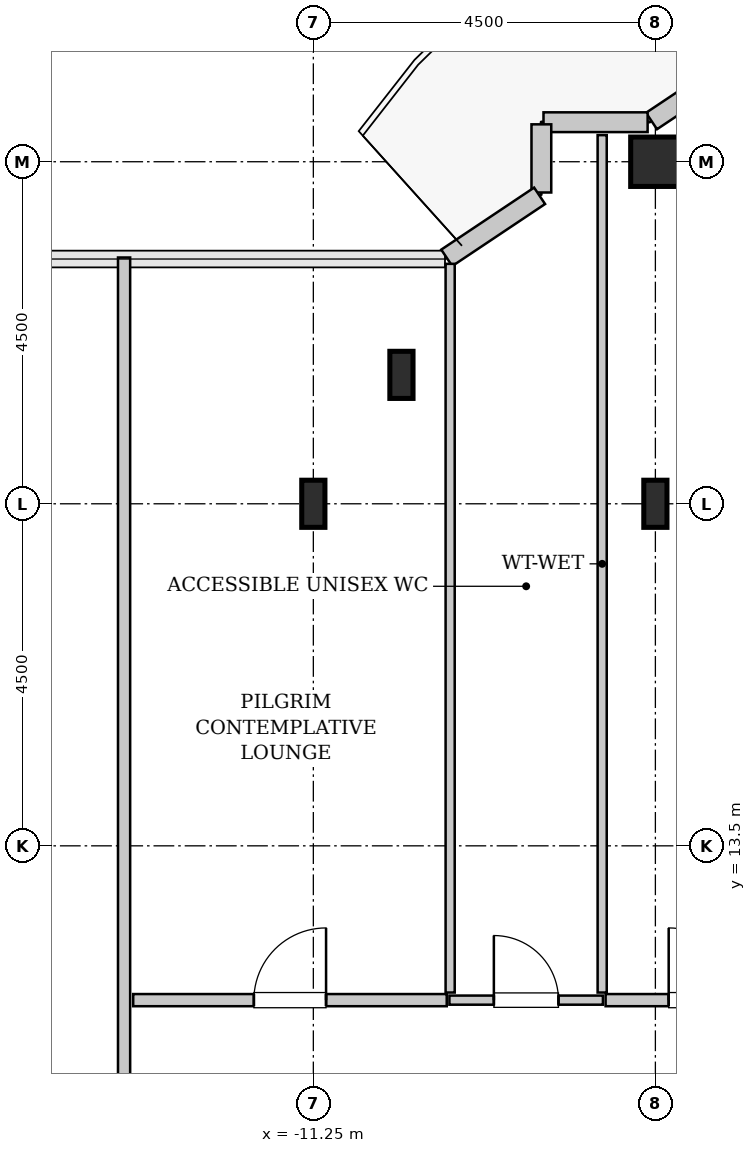
"""IFC4 building model, lengths in metres.
Left out: names, types, materials, properties, quantities, classifications, styles, units other than length and angle.
Written with IfcOpenShell. Run it as: python <this file> out.ifc"""

import sys

from ifc_helpers import new_model, si_unit, direction, frame, frame_2d, origin, origin_2d, place, context, subcontext, project, spatial, rectangle, hollow_rectangle, i_section, extrude, source, transform, mapped, element, fill, save


model = new_model("IFC4")
c1 = context("Model", 3, precision=1e-05, world=origin(), true_north=direction((0.0, 1.0)))
c2 = subcontext(c1, "Body", "Model", "MODEL_VIEW")
j1 = project(units=[si_unit("LENGTHUNIT", "METRE"), si_unit("PLANEANGLEUNIT", "RADIAN")], contexts=[c1])
p1 = place(None, origin())
s1 = spatial("IfcSite", under=j1, at=p1, CompositionType="ELEMENT")
p2 = place(p1, origin())
s2 = spatial("IfcBuilding", under=s1, at=p2, CompositionType="ELEMENT")
p3 = place(p2, frame((0.0, 0.0, 283.6)))
s3 = spatial("IfcBuildingStorey", under=s2, at=p3, CompositionType="ELEMENT", Elevation=283.6)
m1 = source(origin(), c2, "Body", "SweptSolid", [
    extrude(i_section(OverallWidth=0.305, OverallDepth=0.62, WebThickness=0.021, FlangeThickness=0.04, FilletRadius=0.027, at=origin_2d()), origin(), (0.0, 0.0, 1.0), 3.8),
])
for number, where, z_axis, x_axis in (
    (1, (-11.25, 18.0, 0.0), (0.0, 0.0, 1.0), (1.0, 0.0, 0.0)),
    (2, (-10.091, 19.696, 0.0), (0.0, 0.0, 1.0), (1.0, 0.0, 0.0)),
    (3, (-6.75, 18.0, 0.0), (0.0, 0.0, 1.0), (1.0, 0.0, 0.0)),
):
    element("IfcColumn", number, at=place(p3, frame(where, z_axis=z_axis, x_axis=x_axis)), inside=s3, PredefinedType="COLUMN", context=c2, shape_type="MappedRepresentation", body=[
        mapped(m1, transform((0.0, 0.0, 0.0), x_axis=(1.0, 0.0, 0.0), y_axis=(0.0, 1.0, 0.0), z_axis=(0.0, 0.0, 1.0), scale=1.0)),
    ])
m2 = source(origin(), c2, "Body", "SweptSolid", [
    extrude(hollow_rectangle(XDim=0.65, YDim=0.65, WallThickness=0.032, InnerFilletRadius=0.032, OuterFilletRadius=0.064, at=origin_2d()), origin(), (0.0, 0.0, 1.0), 3.8),
])
p4 = place(p3, frame((-6.75, 22.5, 0.0), z_axis=(0.0, 0.0, 1.0), x_axis=(1.0, 0.0, 0.0)))
e4 = element("IfcColumn", 4, at=p4, inside=s3, PredefinedType="COLUMN", context=c2, shape_type="MappedRepresentation", body=[
    mapped(m2, transform((0.0, 0.0, 0.0), x_axis=(1.0, 0.0, 0.0), y_axis=(0.0, 1.0, 0.0), z_axis=(0.0, 0.0, 1.0), scale=1.0)),
])
m3 = source(origin(), c2, "Body", "SweptSolid", [
    extrude(rectangle(XDim=0.565, YDim=0.26, at=frame_2d((0.283, 0.0))), origin(), (0.0, 0.0, 1.0), 3.55),
])
p5 = place(p3, frame((-6.331, 23.35, 0.0), z_axis=(0.0, 0.0, 1.0), x_axis=(-0.831651492666, -0.555297933317, 0.0)))
e5 = element("IfcWall", 5, at=p5, inside=s3, PredefinedType="SOLIDWALL", context=c2, shape_type="MappedRepresentation", body=[
    mapped(m3, transform((0.0, 0.0, 0.0), x_axis=(1.0, 0.0, 0.0), y_axis=(0.0, 1.0, 0.0), z_axis=(0.0, 0.0, 1.0), scale=1.0)),
])
m4 = source(origin(), c2, "Body", "SweptSolid", [
    extrude(rectangle(XDim=1.37, YDim=0.26, at=frame_2d((0.685, 0.0))), origin(), (0.0, 0.0, 1.0), 3.55),
])
p6 = place(p3, frame((-6.852, 23.02, 0.0), z_axis=(0.0, 0.0, 1.0), x_axis=(-1.0, 0.0, 0.0)))
e6 = element("IfcWall", 6, at=p6, inside=s3, PredefinedType="SOLIDWALL", context=c2, shape_type="MappedRepresentation", body=[
    mapped(m4, transform((0.0, 0.0, 0.0), x_axis=(1.0, 0.0, 0.0), y_axis=(0.0, 1.0, 0.0), z_axis=(0.0, 0.0, 1.0), scale=1.0)),
])
m5 = source(origin(), c2, "Body", "SweptSolid", [
    extrude(rectangle(XDim=0.897, YDim=0.26, at=frame_2d((0.448, 0.0))), origin(), (0.0, 0.0, 1.0), 3.55),
])
p7 = place(p3, frame((-8.25, 22.992, 0.0), z_axis=(0.0, 0.0, 1.0), x_axis=(0.0, -1.0, 0.0)))
e7 = element("IfcWall", 7, at=p7, inside=s3, PredefinedType="SOLIDWALL", context=c2, shape_type="MappedRepresentation", body=[
    mapped(m5, transform((0.0, 0.0, 0.0), x_axis=(1.0, 0.0, 0.0), y_axis=(0.0, 1.0, 0.0), z_axis=(0.0, 0.0, 1.0), scale=1.0)),
])
m6 = source(origin(), c2, "Body", "SweptSolid", [
    extrude(rectangle(XDim=1.469, YDim=0.26, at=frame_2d((0.734, 0.0))), origin(), (0.0, 0.0, 1.0), 3.55),
])
p8 = place(p3, frame((-8.273, 22.052, 0.0), z_axis=(0.0, 0.0, 1.0), x_axis=(-0.831461760506, -0.555581983884, 0.0)))
e8 = element("IfcWall", 8, at=p8, inside=s3, PredefinedType="SOLIDWALL", context=c2, shape_type="MappedRepresentation", body=[
    mapped(m6, transform((0.0, 0.0, 0.0), x_axis=(1.0, 0.0, 0.0), y_axis=(0.0, 1.0, 0.0), z_axis=(0.0, 0.0, 1.0), scale=1.0)),
])
m7 = source(origin(), c2, "Body", "SweptSolid", [
    extrude(rectangle(XDim=2.02, YDim=0.12, at=frame_2d((1.01, 0.0))), origin(), (0.0, 0.0, 1.0), 3.535),
])
p9 = place(p3, frame((-9.46, 11.47, 0.0), z_axis=(0.0, 0.0, 1.0), x_axis=(1.0, 0.0, 0.0)))
e9 = element("IfcWall", 9, at=p9, inside=s3, PredefinedType="PLUMBINGWALL", context=c2, shape_type="MappedRepresentation", body=[
    mapped(m7, transform((0.0, 0.0, 0.0), x_axis=(1.0, 0.0, 0.0), y_axis=(0.0, 1.0, 0.0), z_axis=(0.0, 0.0, 1.0), scale=1.0)),
])
p10 = place(p9, frame((0.585, 0.0, 0.0)))
e10 = element("IfcOpeningElement", 10, at=p10, cuts=e9, PredefinedType="OPENING", context=c2, shape_type="SweptSolid", body=[
    extrude(rectangle(XDim=0.85, YDim=2.1, at=frame_2d((0.425, 1.05))), frame((0.0, 0.07, 0.0), z_axis=(0.0, -1.0, 0.0), x_axis=(1.0, 0.0, 0.0)), (0.0, 0.0, 1.0), 0.14),
])
m8 = source(origin(), c2, "Body", "SweptSolid", [
    extrude(rectangle(XDim=11.28, YDim=0.12, at=frame_2d((5.64, 0.0))), origin(), (0.0, 0.0, 1.0), 3.535),
])
p11 = place(p3, frame((-7.45, 11.57, 0.0), z_axis=(0.0, 0.0, 1.0), x_axis=(0.0, 1.0, 0.0)))
e11 = element("IfcWall", 11, at=p11, inside=s3, PredefinedType="PLUMBINGWALL", context=c2, shape_type="MappedRepresentation", body=[
    mapped(m8, transform((0.0, 0.0, 0.0), x_axis=(1.0, 0.0, 0.0), y_axis=(0.0, 1.0, 0.0), z_axis=(0.0, 0.0, 1.0), scale=1.0)),
])
m9 = source(origin(), c2, "Body", "SweptSolid", [
    extrude(rectangle(XDim=9.587, YDim=0.12, at=frame_2d((4.793, 0.0))), origin(), (0.0, 0.0, 1.0), 3.535),
])
p12 = place(p3, frame((-9.45, 11.57, 0.0), z_axis=(0.0, 0.0, 1.0), x_axis=(0.0, 1.0, 0.0)))
e12 = element("IfcWall", 12, at=p12, inside=s3, PredefinedType="PLUMBINGWALL", context=c2, shape_type="MappedRepresentation", body=[
    mapped(m9, transform((0.0, 0.0, 0.0), x_axis=(1.0, 0.0, 0.0), y_axis=(0.0, 1.0, 0.0), z_axis=(0.0, 0.0, 1.0), scale=1.0)),
])
m10 = source(origin(), c2, "Body", "SweptSolid", [
    extrude(rectangle(XDim=12.845, YDim=0.16, at=frame_2d((6.422, 0.0))), origin(), (0.0, 0.0, 1.0), 3.535),
])
p13 = place(p3, frame((-13.74, 8.395, 0.0), z_axis=(0.0, 0.0, 1.0), x_axis=(0.0, 1.0, 0.0)))
e13 = element("IfcWall", 13, at=p13, inside=s3, PredefinedType="PARTITIONING", context=c2, shape_type="MappedRepresentation", body=[
    mapped(m10, transform((0.0, 0.0, 0.0), x_axis=(1.0, 0.0, 0.0), y_axis=(0.0, 1.0, 0.0), z_axis=(0.0, 0.0, 1.0), scale=1.0)),
])
p14 = place(p13, frame((1.083, 0.0, 0.0)))
e14 = element("IfcOpeningElement", 14, at=p14, cuts=e13, PredefinedType="OPENING", context=c2, shape_type="SweptSolid", body=[
    extrude(rectangle(XDim=0.95, YDim=2.1, at=frame_2d((0.475, 1.05))), frame((0.0, 0.09, 0.0), z_axis=(0.0, -1.0, 0.0), x_axis=(1.0, 0.0, 0.0)), (0.0, 0.0, 1.0), 0.18),
])
m11 = source(origin(), c2, "Body", "SweptSolid", [
    extrude(rectangle(XDim=4.125, YDim=0.16, at=frame_2d((2.062, 0.0))), origin(), (0.0, 0.0, 1.0), 3.535),
])
p15 = place(p3, frame((-13.62, 11.47, 0.0), z_axis=(0.0, 0.0, 1.0), x_axis=(1.0, 0.0, 0.0)))
e15 = element("IfcWall", 15, at=p15, inside=s3, PredefinedType="PARTITIONING", context=c2, shape_type="MappedRepresentation", body=[
    mapped(m11, transform((0.0, 0.0, 0.0), x_axis=(1.0, 0.0, 0.0), y_axis=(0.0, 1.0, 0.0), z_axis=(0.0, 0.0, 1.0), scale=1.0)),
])
p16 = place(p15, frame((1.587, 0.0, 0.0)))
e16 = element("IfcOpeningElement", 16, at=p16, cuts=e15, PredefinedType="OPENING", context=c2, shape_type="SweptSolid", body=[
    extrude(rectangle(XDim=0.95, YDim=2.1, at=frame_2d((0.475, 1.05))), frame((0.0, 0.09, 0.0), z_axis=(0.0, -1.0, 0.0), x_axis=(1.0, 0.0, 0.0)), (0.0, 0.0, 1.0), 0.18),
])
m12 = source(origin(), c2, "Body", "SweptSolid", [
    extrude(rectangle(XDim=2.61, YDim=0.16, at=frame_2d((1.305, 0.0))), origin(), (0.0, 0.0, 1.0), 3.535),
])
p17 = place(p3, frame((-7.405, 11.47, 0.0), z_axis=(0.0, 0.0, 1.0), x_axis=(1.0, 0.0, 0.0)))
e17 = element("IfcWall", 17, at=p17, inside=s3, PredefinedType="PARTITIONING", context=c2, shape_type="MappedRepresentation", body=[
    mapped(m12, transform((0.0, 0.0, 0.0), x_axis=(1.0, 0.0, 0.0), y_axis=(0.0, 1.0, 0.0), z_axis=(0.0, 0.0, 1.0), scale=1.0)),
])
p18 = place(p17, frame((0.83, 0.0, 0.0)))
e18 = element("IfcOpeningElement", 18, at=p18, cuts=e17, PredefinedType="OPENING", context=c2, shape_type="SweptSolid", body=[
    extrude(rectangle(XDim=0.95, YDim=2.1, at=frame_2d((0.475, 1.05))), frame((0.0, 0.09, 0.0), z_axis=(0.0, -1.0, 0.0), x_axis=(1.0, 0.0, 0.0)), (0.0, 0.0, 1.0), 0.18),
])
m13 = source(origin(), c2, "Body", "SweptSolid", [
    extrude(rectangle(XDim=0.85, YDim=2.1, at=frame_2d((0.425, 1.05))), frame((0.0, 0.025, 0.0), z_axis=(0.0, -1.0, 0.0), x_axis=(1.0, 0.0, 0.0)), (0.0, 0.0, 1.0), 0.05),
])
p19 = place(p10, origin())
e19 = element("IfcDoor", 19, at=p19, inside=s3, OperationType="SINGLE_SWING_LEFT", PredefinedType="DOOR", context=c2, shape_type="MappedRepresentation", body=[
    mapped(m13, transform((0.0, 0.0, 0.0), x_axis=(1.0, 0.0, 0.0), y_axis=(0.0, 1.0, 0.0), z_axis=(0.0, 0.0, 1.0), scale=1.0)),
])
fill(e10, e19)
m14 = source(origin(), c2, "Body", "SweptSolid", [
    extrude(rectangle(XDim=0.95, YDim=2.1, at=frame_2d((0.475, 1.05))), frame((0.0, 0.025, 0.0), z_axis=(0.0, -1.0, 0.0), x_axis=(1.0, 0.0, 0.0)), (0.0, 0.0, 1.0), 0.05),
])
p20 = place(p16, origin())
e20 = element("IfcDoor", 20, at=p20, inside=s3, OperationType="SINGLE_SWING_RIGHT", PredefinedType="DOOR", context=c2, shape_type="MappedRepresentation", body=[
    mapped(m14, transform((0.0, 0.0, 0.0), x_axis=(1.0, 0.0, 0.0), y_axis=(0.0, 1.0, 0.0), z_axis=(0.0, 0.0, 1.0), scale=1.0)),
])
fill(e16, e20)
p21 = place(p18, origin())
e21 = element("IfcDoor", 21, at=p21, inside=s3, OperationType="SINGLE_SWING_LEFT", PredefinedType="DOOR", context=c2, shape_type="MappedRepresentation", body=[
    mapped(m14, transform((0.0, 0.0, 0.0), x_axis=(1.0, 0.0, 0.0), y_axis=(0.0, 1.0, 0.0), z_axis=(0.0, 0.0, 1.0), scale=1.0)),
])
fill(e18, e21)
save(model, sys.argv[1])
